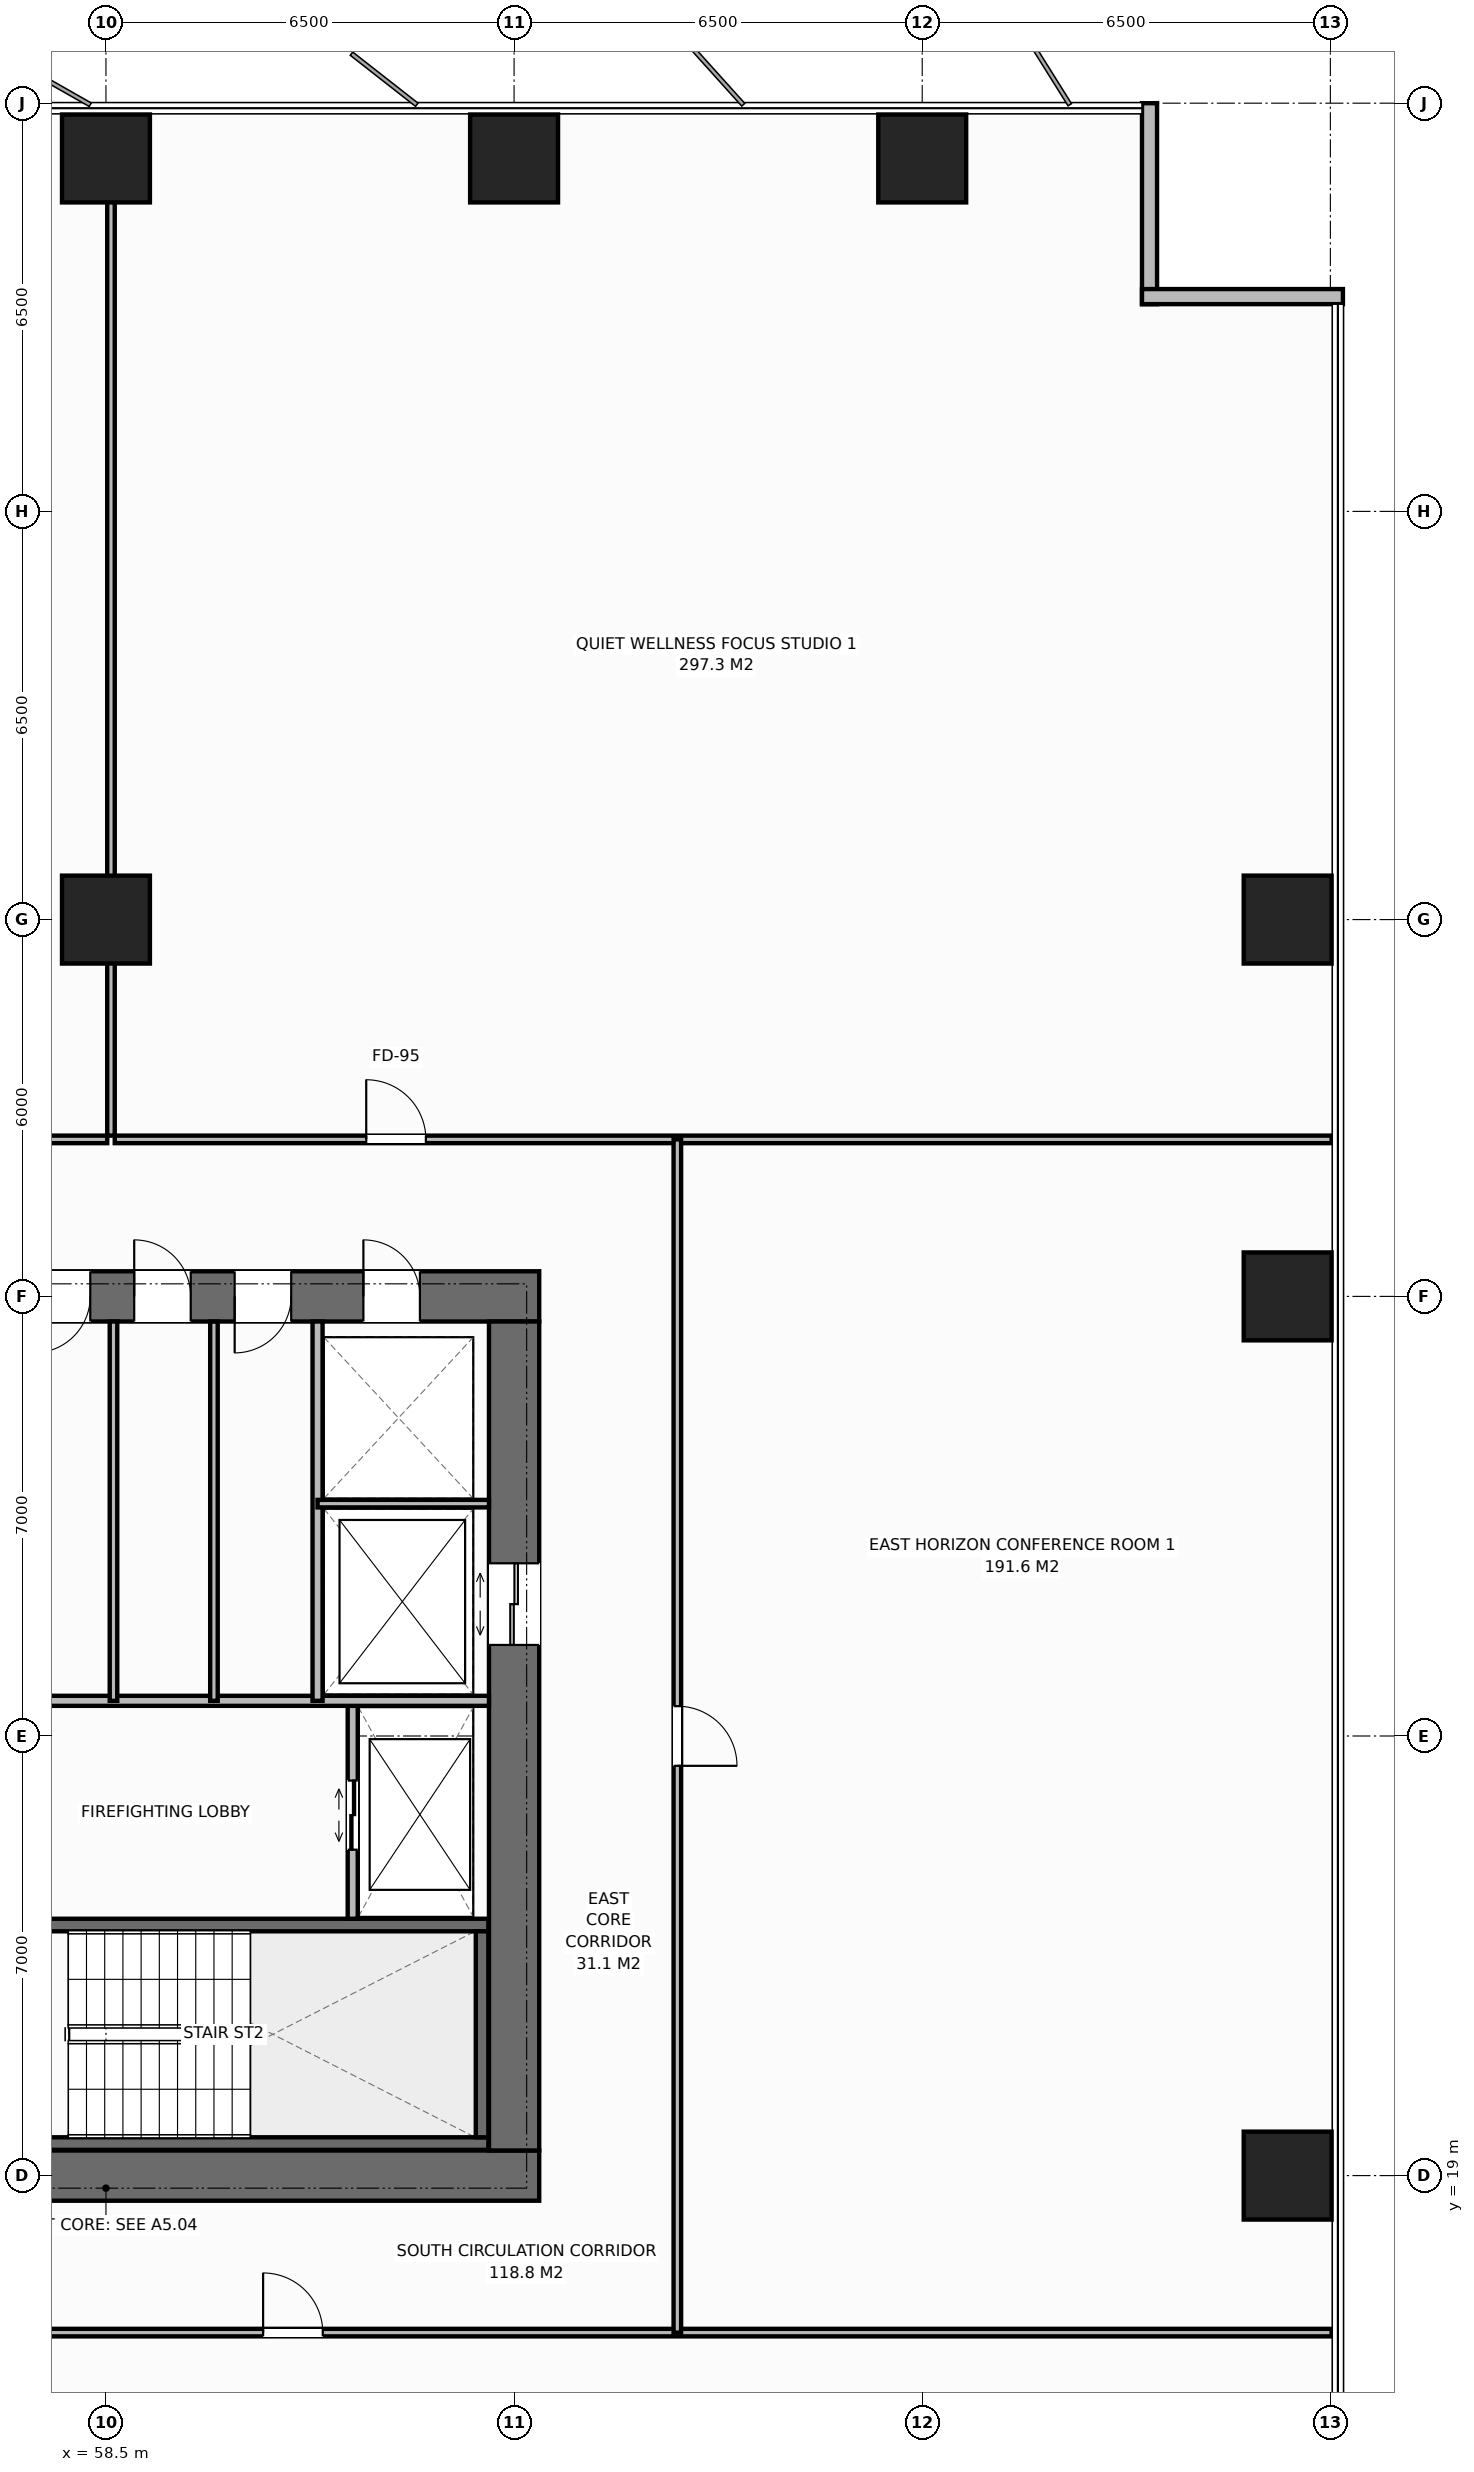
"""IFC4 building model, lengths in metres.
Left out: names, types, materials, properties, quantities, classifications, styles, units other than length and angle.
Written with IfcOpenShell. Run it as: python <this file> out.ifc"""

import sys

from ifc_helpers import new_model, si_unit, direction, frame, frame_2d, origin, origin_2d, place, context, subcontext, project, spatial, rectangle, extrude, element, fill, save


model = new_model("IFC4")
c1 = context("Model", 3, precision=1e-05, world=origin(), true_north=direction((0.0, 1.0)))
c2 = subcontext(c1, "Body", "Model", "MODEL_VIEW")
j1 = project(units=[si_unit("LENGTHUNIT", "METRE"), si_unit("PLANEANGLEUNIT", "RADIAN")], contexts=[c1])
p1 = place(None, origin())
s1 = spatial("IfcSite", under=j1, at=p1, CompositionType="ELEMENT")
p2 = place(p1, origin())
s2 = spatial("IfcBuilding", under=s1, at=p2, CompositionType="ELEMENT")
p3 = place(p2, frame((0.0, 0.0, 46.8)))
s3 = spatial("IfcBuildingStorey", under=s2, at=p3, CompositionType="ELEMENT", Elevation=46.8)
p4 = place(p3, frame((51.6, 19.0, 0.0), z_axis=(0.0, 0.0, 1.0), x_axis=(1.0, 0.0, 0.0)))
e1 = element("IfcWall", 1, at=p4, inside=s3, PredefinedType="SHEAR", context=c2, shape_type="SweptSolid", body=[
    extrude(rectangle(XDim=13.8, YDim=0.8, at=frame_2d((6.9, 0.0))), origin(), (0.0, 0.0, 1.0), 3.8),
])
p5 = place(p4, frame((3.12, 0.0, 0.0)))
e2 = element("IfcOpeningElement", 2, at=p5, cuts=e1, PredefinedType="OPENING", context=c2, shape_type="SweptSolid", body=[
    extrude(rectangle(XDim=1.4, YDim=2.2, at=frame_2d((0.7, 1.1))), frame((0.0, 0.41, 0.0), z_axis=(0.0, -1.0, 0.0), x_axis=(1.0, 0.0, 0.0)), (0.0, 0.0, 1.0), 0.82),
])
p6 = place(p3, frame((51.6, 33.0, 0.0), z_axis=(0.0, 0.0, 1.0), x_axis=(1.0, 0.0, 0.0)))
e3 = element("IfcWall", 3, at=p6, inside=s3, PredefinedType="SHEAR", context=c2, shape_type="SweptSolid", body=[
    extrude(rectangle(XDim=13.8, YDim=0.8, at=frame_2d((6.9, 0.0))), origin(), (0.0, 0.0, 1.0), 3.8),
])
p7 = place(p6, frame((3.12, 0.0, 0.0)))
e4 = element("IfcOpeningElement", 4, at=p7, cuts=e3, PredefinedType="OPENING", context=c2, shape_type="SweptSolid", body=[
    extrude(rectangle(XDim=1.4, YDim=2.2, at=frame_2d((0.7, 1.1))), frame((0.0, 0.41, 0.0), z_axis=(0.0, -1.0, 0.0), x_axis=(1.0, 0.0, 0.0)), (0.0, 0.0, 1.0), 0.82),
])
p8 = place(p6, frame((11.0, 0.0, 0.0)))
e5 = element("IfcOpeningElement", 5, at=p8, cuts=e3, PredefinedType="OPENING", context=c2, shape_type="SweptSolid", body=[
    extrude(rectangle(XDim=0.9, YDim=2.15, at=frame_2d((0.45, 1.075))), frame((0.0, 0.41, 0.0), z_axis=(0.0, -1.0, 0.0), x_axis=(1.0, 0.0, 0.0)), (0.0, 0.0, 1.0), 0.82),
])
p9 = place(p6, frame((5.75, 0.0, 0.0)))
e6 = element("IfcOpeningElement", 6, at=p9, cuts=e3, PredefinedType="OPENING", context=c2, shape_type="SweptSolid", body=[
    extrude(rectangle(XDim=0.9, YDim=2.15, at=frame_2d((0.45, 1.075))), frame((0.0, 0.41, 0.0), z_axis=(0.0, -1.0, 0.0), x_axis=(1.0, 0.0, 0.0)), (0.0, 0.0, 1.0), 0.82),
])
p10 = place(p6, frame((7.35, 0.0, 0.0)))
e7 = element("IfcOpeningElement", 7, at=p10, cuts=e3, PredefinedType="OPENING", context=c2, shape_type="SweptSolid", body=[
    extrude(rectangle(XDim=0.9, YDim=2.15, at=frame_2d((0.45, 1.075))), frame((0.0, 0.41, 0.0), z_axis=(0.0, -1.0, 0.0), x_axis=(1.0, 0.0, 0.0)), (0.0, 0.0, 1.0), 0.82),
])
p11 = place(p6, frame((8.95, 0.0, 0.0)))
e8 = element("IfcOpeningElement", 8, at=p11, cuts=e3, PredefinedType="OPENING", context=c2, shape_type="SweptSolid", body=[
    extrude(rectangle(XDim=0.9, YDim=2.15, at=frame_2d((0.45, 1.075))), frame((0.0, 0.41, 0.0), z_axis=(0.0, -1.0, 0.0), x_axis=(1.0, 0.0, 0.0)), (0.0, 0.0, 1.0), 0.82),
])
p12 = place(p3, frame((65.0, 19.4, 0.0), z_axis=(0.0, 0.0, 1.0), x_axis=(0.0, 1.0, 0.0)))
e9 = element("IfcWall", 9, at=p12, inside=s3, PredefinedType="SHEAR", context=c2, shape_type="SweptSolid", body=[
    extrude(rectangle(XDim=13.2, YDim=0.8, at=frame_2d((6.6, 0.0))), origin(), (0.0, 0.0, 1.0), 3.8),
])
p13 = place(p12, frame((8.05, 0.0, 0.0)))
e10 = element("IfcOpeningElement", 10, at=p13, cuts=e9, PredefinedType="OPENING", context=c2, shape_type="SweptSolid", body=[
    extrude(rectangle(XDim=1.3, YDim=2.2, at=frame_2d((0.65, 1.1))), frame((0.0, 0.41, 0.0), z_axis=(0.0, -1.0, 0.0), x_axis=(1.0, 0.0, 0.0)), (0.0, 0.0, 1.0), 0.82),
])
p14 = place(p3, frame((56.16, 19.51, 0.0), z_axis=(0.0, 0.0, 1.0), x_axis=(1.0, 0.0, 0.0)))
e11 = element("IfcWall", 11, at=p14, inside=s3, PredefinedType="SHEAR", context=c2, shape_type="SweptSolid", body=[
    extrude(rectangle(XDim=8.43, YDim=0.2, at=frame_2d((4.215, 0.0))), origin(), (0.0, 0.0, 1.0), 3.8),
])
p15 = place(p3, frame((56.16, 22.99, 0.0), z_axis=(0.0, 0.0, 1.0), x_axis=(1.0, 0.0, 0.0)))
e12 = element("IfcWall", 12, at=p15, inside=s3, PredefinedType="SHEAR", context=c2, shape_type="SweptSolid", body=[
    extrude(rectangle(XDim=8.43, YDim=0.2, at=frame_2d((4.215, 0.0))), origin(), (0.0, 0.0, 1.0), 3.8),
])
p16 = place(p15, frame((0.45, 0.0, 0.0)))
e13 = element("IfcOpeningElement", 13, at=p16, cuts=e12, PredefinedType="OPENING", context=c2, shape_type="SweptSolid", body=[
    extrude(rectangle(XDim=1.0, YDim=2.15, at=frame_2d((0.5, 1.075))), frame((0.0, 0.11, 0.0), z_axis=(0.0, -1.0, 0.0), x_axis=(1.0, 0.0, 0.0)), (0.0, 0.0, 1.0), 0.22),
])
p17 = place(p3, frame((64.49, 19.61, 0.0), z_axis=(0.0, 0.0, 1.0), x_axis=(0.0, 1.0, 0.0)))
e14 = element("IfcWall", 14, at=p17, inside=s3, PredefinedType="SHEAR", context=c2, shape_type="SweptSolid", body=[
    extrude(rectangle(XDim=3.28, YDim=0.2, at=frame_2d((1.64, 0.0))), origin(), (0.0, 0.0, 1.0), 3.8),
])
for number, where, z_axis, x_axis in (
    (15, (58.5, 39.0, 0.0), (0.0, 0.0, 1.0), (1.0, 0.0, 0.0)),
    (16, (58.5, 51.12, 0.0), (0.0, 0.0, 1.0), (1.0, 0.0, 0.0)),
    (17, (65.0, 51.12, 0.0), (0.0, 0.0, 1.0), (1.0, 0.0, 0.0)),
    (18, (71.5, 51.12, 0.0), (0.0, 0.0, 1.0), (1.0, 0.0, 0.0)),
    (19, (77.32, 19.0, 0.0), (0.0, 0.0, 1.0), (1.0, 0.0, 0.0)),
    (20, (77.32, 33.0, 0.0), (0.0, 0.0, 1.0), (1.0, 0.0, 0.0)),
    (21, (77.32, 39.0, 0.0), (0.0, 0.0, 1.0), (1.0, 0.0, 0.0)),
):
    element("IfcColumn", number, at=place(p3, frame(where, z_axis=z_axis, x_axis=x_axis)), inside=s3, PredefinedType="COLUMN", context=c2, shape_type="SweptSolid", body=[
        extrude(rectangle(XDim=1.4, YDim=1.4, at=origin_2d()), origin(), (0.0, 0.0, 1.0), 3.8),
    ])
for number, where, z_axis, x_axis in (
    (22, (75.12, 52.0, 0.0), (0.0, 0.0, 1.0), (0.0, -1.0, 0.0)),
    (23, (75.0, 48.92, 0.0), (0.0, 0.0, 1.0), (1.0, 0.0, 0.0)),
):
    element("IfcWall", number, at=place(p3, frame(where, z_axis=z_axis, x_axis=x_axis)), inside=s3, PredefinedType="STANDARD", context=c2, shape_type="SweptSolid", body=[
        extrude(rectangle(XDim=3.2, YDim=0.24, at=frame_2d((1.6, 0.0))), origin(), (0.0, 0.0, 1.0), 3.55),
    ])
p18 = place(p3, frame((62.43, 23.09, 0.0), z_axis=(0.0, 0.0, 1.0), x_axis=(0.0, 1.0, 0.0)))
e24 = element("IfcWall", 24, at=p18, inside=s3, PredefinedType="STANDARD", context=c2, shape_type="SweptSolid", body=[
    extrude(rectangle(XDim=3.47, YDim=0.16, at=frame_2d((1.735, 0.0))), origin(), (0.0, 0.0, 1.0), 3.55),
])
p19 = place(p18, frame((1.1, 0.0, 0.0)))
e25 = element("IfcOpeningElement", 25, at=p19, cuts=e24, PredefinedType="OPENING", context=c2, shape_type="SweptSolid", body=[
    extrude(rectangle(XDim=1.1, YDim=2.2, at=frame_2d((0.55, 1.1))), frame((0.0, 0.09, 0.0), z_axis=(0.0, -1.0, 0.0), x_axis=(1.0, 0.0, 0.0)), (0.0, 0.0, 1.0), 0.18),
])
p20 = place(p3, frame((56.26, 26.56, 0.0), z_axis=(0.0, 0.0, 1.0), x_axis=(1.0, 0.0, 0.0)))
e26 = element("IfcWall", 26, at=p20, inside=s3, PredefinedType="STANDARD", context=c2, shape_type="SweptSolid", body=[
    extrude(rectangle(XDim=8.34, YDim=0.16, at=frame_2d((4.17, 0.0))), origin(), (0.0, 0.0, 1.0), 3.55),
])
p21 = place(p3, frame((61.87, 26.56, 0.0), z_axis=(0.0, 0.0, 1.0), x_axis=(0.0, 1.0, 0.0)))
e27 = element("IfcWall", 27, at=p21, inside=s3, PredefinedType="STANDARD", context=c2, shape_type="SweptSolid", body=[
    extrude(rectangle(XDim=6.04, YDim=0.16, at=frame_2d((3.02, 0.0))), origin(), (0.0, 0.0, 1.0), 3.55),
])
p22 = place(p3, frame((61.87, 29.7, 0.0), z_axis=(0.0, 0.0, 1.0), x_axis=(1.0, 0.0, 0.0)))
e28 = element("IfcWall", 28, at=p22, inside=s3, PredefinedType="PARTITIONING", context=c2, shape_type="SweptSolid", body=[
    extrude(rectangle(XDim=2.73, YDim=0.12, at=frame_2d((1.365, 0.0))), origin(), (0.0, 0.0, 1.0), 3.55),
])
for number, where, z_axis, x_axis in (
    (29, (58.62, 26.56, 0.0), (0.0, 0.0, 1.0), (0.0, 1.0, 0.0)),
    (30, (60.22, 26.56, 0.0), (0.0, 0.0, 1.0), (0.0, 1.0, 0.0)),
):
    element("IfcWall", number, at=place(p3, frame(where, z_axis=z_axis, x_axis=x_axis)), inside=s3, PredefinedType="PARTITIONING", context=c2, shape_type="SweptSolid", body=[
        extrude(rectangle(XDim=6.04, YDim=0.12, at=frame_2d((3.02, 0.0))), origin(), (0.0, 0.0, 1.0), 3.55),
    ])
p23 = place(p3, frame((58.58, 35.56, 0.0), z_axis=(0.0, 0.0, 1.0), x_axis=(0.0, 1.0, 0.0)))
e31 = element("IfcWall", 31, at=p23, inside=s3, PredefinedType="PARTITIONING", context=c2, shape_type="SweptSolid", body=[
    extrude(rectangle(XDim=16.42, YDim=0.12, at=frame_2d((8.21, 0.0))), origin(), (0.0, 0.0, 1.0), 2.9),
])
p24 = place(p3, frame((35.462, 35.5, 0.0), z_axis=(0.0, 0.0, 1.0), x_axis=(1.0, 0.0, 0.0)))
e32 = element("IfcWall", 32, at=p24, inside=s3, PredefinedType="PARTITIONING", context=c2, shape_type="SweptSolid", body=[
    extrude(rectangle(XDim=23.058, YDim=0.12, at=frame_2d((11.529, 0.0))), origin(), (0.0, 0.0, 1.0), 3.55),
])
p25 = place(p24, frame((11.054, 0.0, 0.0)))
e33 = element("IfcOpeningElement", 33, at=p25, cuts=e32, PredefinedType="OPENING", context=c2, shape_type="SweptSolid", body=[
    extrude(rectangle(XDim=0.95, YDim=2.15, at=frame_2d((0.475, 1.075))), frame((0.0, 0.07, 0.0), z_axis=(0.0, -1.0, 0.0), x_axis=(1.0, 0.0, 0.0)), (0.0, 0.0, 1.0), 0.14),
])
p26 = place(p3, frame((58.64, 35.5, 0.0), z_axis=(0.0, 0.0, 1.0), x_axis=(1.0, 0.0, 0.0)))
e34 = element("IfcWall", 34, at=p26, inside=s3, PredefinedType="PARTITIONING", context=c2, shape_type="SweptSolid", body=[
    extrude(rectangle(XDim=19.38, YDim=0.12, at=frame_2d((9.69, 0.0))), origin(), (0.0, 0.0, 1.0), 3.55),
])
p27 = place(p26, frame((4.005, 0.0, 0.0)))
e35 = element("IfcOpeningElement", 35, at=p27, cuts=e34, PredefinedType="OPENING", context=c2, shape_type="SweptSolid", body=[
    extrude(rectangle(XDim=0.95, YDim=2.15, at=frame_2d((0.475, 1.075))), frame((0.0, 0.07, 0.0), z_axis=(0.0, -1.0, 0.0), x_axis=(1.0, 0.0, 0.0)), (0.0, 0.0, 1.0), 0.14),
])
p28 = place(p3, frame((55.356, 16.5, 0.0), z_axis=(0.0, 0.0, 1.0), x_axis=(1.0, 0.0, 0.0)))
e36 = element("IfcWall", 36, at=p28, inside=s3, PredefinedType="PARTITIONING", context=c2, shape_type="SweptSolid", body=[
    extrude(rectangle(XDim=22.664, YDim=0.12, at=frame_2d((11.332, 0.0))), origin(), (0.0, 0.0, 1.0), 3.55),
])
p29 = place(p28, frame((5.647, 0.0, 0.0)))
e37 = element("IfcOpeningElement", 37, at=p29, cuts=e36, PredefinedType="OPENING", context=c2, shape_type="SweptSolid", body=[
    extrude(rectangle(XDim=0.95, YDim=2.15, at=frame_2d((0.475, 1.075))), frame((0.0, 0.07, 0.0), z_axis=(0.0, -1.0, 0.0), x_axis=(1.0, 0.0, 0.0)), (0.0, 0.0, 1.0), 0.14),
])
p30 = place(p3, frame((67.6, 16.5, 0.0), z_axis=(0.0, 0.0, 1.0), x_axis=(0.0, 1.0, 0.0)))
e38 = element("IfcWall", 38, at=p30, inside=s3, PredefinedType="PARTITIONING", context=c2, shape_type="SweptSolid", body=[
    extrude(rectangle(XDim=19.0, YDim=0.12, at=frame_2d((9.5, 0.0))), origin(), (0.0, 0.0, 1.0), 3.55),
])
p31 = place(p30, frame((9.025, 0.0, 0.0)))
e39 = element("IfcOpeningElement", 39, at=p31, cuts=e38, PredefinedType="OPENING", context=c2, shape_type="SweptSolid", body=[
    extrude(rectangle(XDim=0.95, YDim=2.15, at=frame_2d((0.475, 1.075))), frame((0.0, 0.07, 0.0), z_axis=(0.0, -1.0, 0.0), x_axis=(1.0, 0.0, 0.0)), (0.0, 0.0, 1.0), 0.14),
])
p32 = place(p19, origin())
e40 = element("IfcDoor", 40, at=p32, inside=s3, OperationType="DOUBLE_DOOR_SLIDING", PredefinedType="DOOR", context=c2, shape_type="SweptSolid", body=[
    extrude(rectangle(XDim=1.1, YDim=2.2, at=frame_2d((0.55, 1.1))), frame((0.0, 0.025, 0.0), z_axis=(0.0, -1.0, 0.0), x_axis=(1.0, 0.0, 0.0)), (0.0, 0.0, 1.0), 0.05),
])
fill(e25, e40)
p33 = place(p13, origin())
e41 = element("IfcDoor", 41, at=p33, inside=s3, OperationType="DOUBLE_DOOR_SLIDING", PredefinedType="DOOR", context=c2, shape_type="SweptSolid", body=[
    extrude(rectangle(XDim=1.3, YDim=2.2, at=frame_2d((0.65, 1.1))), frame((0.0, 0.025, 0.0), z_axis=(0.0, -1.0, 0.0), x_axis=(1.0, 0.0, 0.0)), (0.0, 0.0, 1.0), 0.05),
])
fill(e10, e41)
p34 = place(p8, origin())
e42 = element("IfcDoor", 42, at=p34, inside=s3, OperationType="SINGLE_SWING_LEFT", PredefinedType="DOOR", context=c2, shape_type="SweptSolid", body=[
    extrude(rectangle(XDim=0.9, YDim=2.15, at=frame_2d((0.45, 1.075))), frame((0.0, -0.075, 0.0), z_axis=(0.0, -1.0, 0.0), x_axis=(1.0, 0.0, 0.0)), (0.0, 0.0, 1.0), 0.05),
])
fill(e5, e42)
p35 = place(p9, origin())
e43 = element("IfcDoor", 43, at=p35, inside=s3, OperationType="SINGLE_SWING_RIGHT", PredefinedType="DOOR", context=c2, shape_type="SweptSolid", body=[
    extrude(rectangle(XDim=0.9, YDim=2.15, at=frame_2d((0.45, 1.075))), frame((0.0, -0.075, 0.0), z_axis=(0.0, -1.0, 0.0), x_axis=(1.0, 0.0, 0.0)), (0.0, 0.0, 1.0), 0.05),
])
fill(e6, e43)
p36 = place(p10, origin())
e44 = element("IfcDoor", 44, at=p36, inside=s3, OperationType="SINGLE_SWING_LEFT", PredefinedType="DOOR", context=c2, shape_type="SweptSolid", body=[
    extrude(rectangle(XDim=0.9, YDim=2.15, at=frame_2d((0.45, 1.075))), frame((0.0, -0.075, 0.0), z_axis=(0.0, -1.0, 0.0), x_axis=(1.0, 0.0, 0.0)), (0.0, 0.0, 1.0), 0.05),
])
fill(e7, e44)
p37 = place(p11, origin())
e45 = element("IfcDoor", 45, at=p37, inside=s3, OperationType="SINGLE_SWING_RIGHT", PredefinedType="DOOR", context=c2, shape_type="SweptSolid", body=[
    extrude(rectangle(XDim=0.9, YDim=2.15, at=frame_2d((0.45, 1.075))), frame((0.0, -0.075, 0.0), z_axis=(0.0, -1.0, 0.0), x_axis=(1.0, 0.0, 0.0)), (0.0, 0.0, 1.0), 0.05),
])
fill(e8, e45)
p38 = place(p27, origin())
e46 = element("IfcDoor", 46, at=p38, inside=s3, OperationType="SINGLE_SWING_LEFT", PredefinedType="DOOR", context=c2, shape_type="SweptSolid", body=[
    extrude(rectangle(XDim=0.95, YDim=2.15, at=frame_2d((0.475, 1.075))), frame((0.0, 0.025, 0.0), z_axis=(0.0, -1.0, 0.0), x_axis=(1.0, 0.0, 0.0)), (0.0, 0.0, 1.0), 0.05),
])
fill(e35, e46)
p39 = place(p29, origin())
e47 = element("IfcDoor", 47, at=p39, inside=s3, OperationType="SINGLE_SWING_LEFT", PredefinedType="DOOR", context=c2, shape_type="SweptSolid", body=[
    extrude(rectangle(XDim=0.95, YDim=2.15, at=frame_2d((0.475, 1.075))), frame((0.0, 0.025, 0.0), z_axis=(0.0, -1.0, 0.0), x_axis=(1.0, 0.0, 0.0)), (0.0, 0.0, 1.0), 0.05),
])
fill(e37, e47)
p40 = place(p31, origin())
e48 = element("IfcDoor", 48, at=p40, inside=s3, OperationType="SINGLE_SWING_RIGHT", PredefinedType="DOOR", context=c2, shape_type="SweptSolid", body=[
    extrude(rectangle(XDim=0.95, YDim=2.15, at=frame_2d((0.475, 1.075))), frame((0.0, 0.025, 0.0), z_axis=(0.0, -1.0, 0.0), x_axis=(1.0, 0.0, 0.0)), (0.0, 0.0, 1.0), 0.05),
])
fill(e39, e48)
save(model, sys.argv[1])
